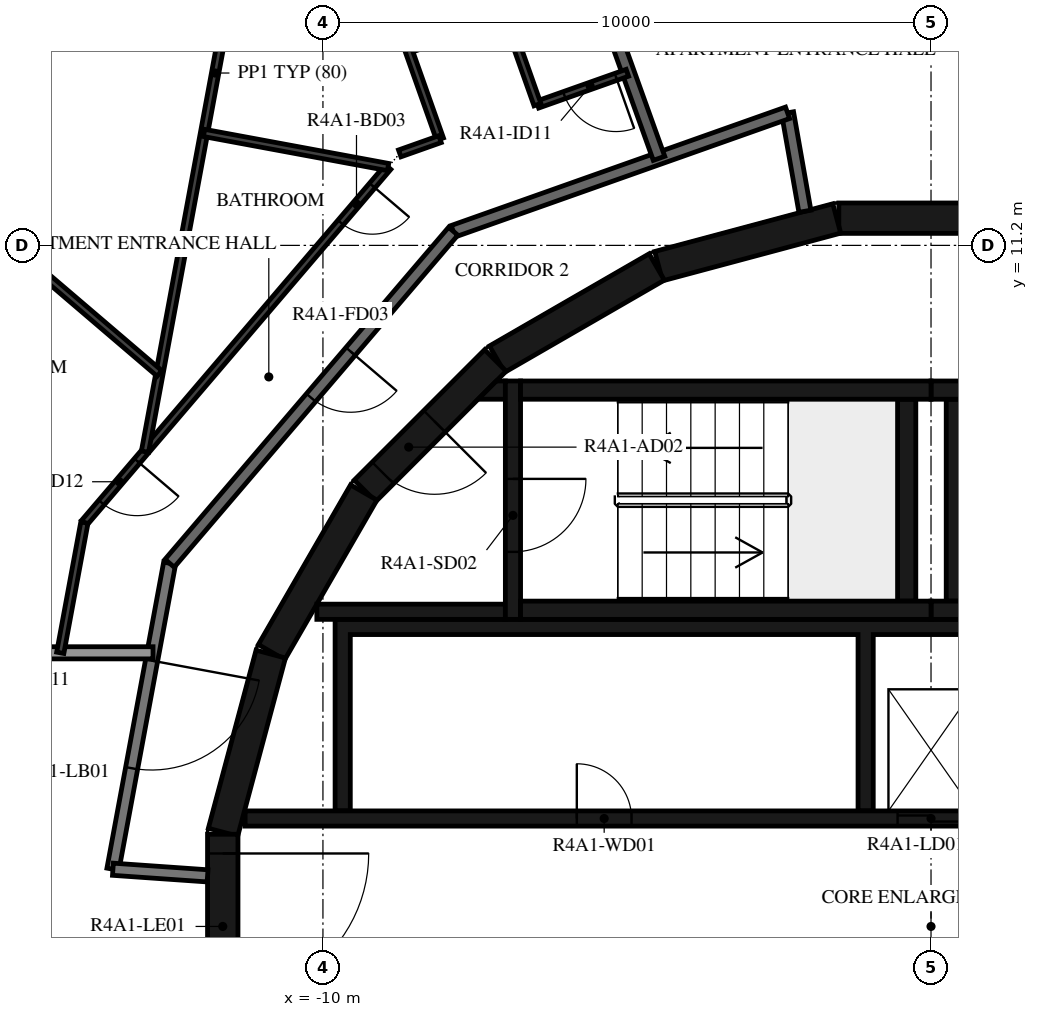
"""IFC4 building model, lengths in metres.
Left out: names, types, materials, properties, quantities, classifications, styles, units other than length and angle.
Written with IfcOpenShell. Run it as: python <this file> out.ifc"""

import sys

from ifc_helpers import new_model, si_unit, direction, frame, frame_2d, origin, place, context, subcontext, project, spatial, polyline, rectangle, outline, extrude, element, fill, save


model = new_model("IFC4")
c1 = context("Model", 3, precision=1e-05, world=origin(), true_north=direction((0.0, 1.0)))
c2 = subcontext(c1, "Body", "Model", "MODEL_VIEW")
j1 = project(units=[si_unit("LENGTHUNIT", "METRE"), si_unit("PLANEANGLEUNIT", "RADIAN")], contexts=[c1])
p1 = place(None, origin())
s1 = spatial("IfcSite", under=j1, at=p1, CompositionType="ELEMENT")
p2 = place(p1, origin())
s2 = spatial("IfcBuilding", under=s1, at=p2, CompositionType="ELEMENT")
p3 = place(p2, frame((0.0, 0.0, 155.2)))
s3 = spatial("IfcBuildingStorey", under=s2, at=p3, CompositionType="ELEMENT", Elevation=155.2)
for number, where, z_axis, x_axis in (
    (1, (1.516, 11.647, 0.0), (0.0, 0.0, 1.0), (-1.0, 0.0, 0.0)),
    (2, (-1.55, 11.643, 0.0), (0.0, 0.0, 1.0), (-0.966, -0.259, 0.0)),
    (3, (-4.51, 10.845, 0.0), (0.0, 0.0, 1.0), (-0.866, -0.5, 0.0)),
):
    element("IfcWall", number, at=place(p3, frame(where, z_axis=z_axis, x_axis=x_axis)), inside=s3, PredefinedType="SHEAR", context=c2, shape_type="SweptSolid", body=[
        extrude(rectangle(XDim=3.033, YDim=0.5, at=frame_2d((1.516, 0.0))), origin(), (0.0, 0.0, 1.0), 3.12),
    ])
p4 = place(p3, frame((-7.164, 9.308, 0.0), z_axis=(0.0, 0.0, 1.0), x_axis=(-0.707106781187, -0.707106781187, 0.0)))
e4 = element("IfcWall", 4, at=p4, inside=s3, PredefinedType="SHEAR", context=c2, shape_type="SweptSolid", body=[
    extrude(rectangle(XDim=3.032, YDim=0.5, at=frame_2d((1.516, 0.0))), origin(), (0.0, 0.0, 1.0), 3.12),
])
p5 = place(p4, frame((1.416, 0.0, 0.0)))
e5 = element("IfcOpeningElement", 5, at=p5, cuts=e4, PredefinedType="OPENING", context=c2, shape_type="SweptSolid", body=[
    extrude(rectangle(XDim=1.2, YDim=2.1, at=frame_2d((0.6, 1.05))), frame((0.0, 0.26, 0.0), z_axis=(0.0, -1.0, 0.0), x_axis=(1.0, 0.0, 0.0)), (0.0, 0.0, 1.0), 0.52),
])
for number, where, z_axis, x_axis in (
    (6, (-9.329, 7.137, 0.0), (0.0, 0.0, 1.0), (-0.5, -0.866, 0.0)),
    (7, (-10.858, 4.479, 0.0), (0.0, 0.0, 1.0), (-0.259, -0.966, 0.0)),
):
    element("IfcWall", number, at=place(p3, frame(where, z_axis=z_axis, x_axis=x_axis)), inside=s3, PredefinedType="SHEAR", context=c2, shape_type="SweptSolid", body=[
        extrude(rectangle(XDim=3.033, YDim=0.5, at=frame_2d((1.516, 0.0))), origin(), (0.0, 0.0, 1.0), 3.12),
    ])
p6 = place(p3, frame((-11.647, 1.516, 0.0), z_axis=(0.0, 0.0, 1.0), x_axis=(0.0, -1.0, 0.0)))
e8 = element("IfcWall", 8, at=p6, inside=s3, PredefinedType="SHEAR", context=c2, shape_type="SweptSolid", body=[
    extrude(rectangle(XDim=3.033, YDim=0.5, at=frame_2d((1.516, 0.0))), origin(), (0.0, 0.0, 1.0), 3.12),
])
p7 = place(p6, frame((0.316, 0.0, 0.0)))
e9 = element("IfcOpeningElement", 9, at=p7, cuts=e8, PredefinedType="OPENING", context=c2, shape_type="SweptSolid", body=[
    extrude(rectangle(XDim=2.4, YDim=2.1, at=frame_2d((1.2, 1.05))), frame((0.0, 0.26, 0.0), z_axis=(0.0, -1.0, 0.0), x_axis=(1.0, 0.0, 0.0)), (0.0, 0.0, 1.0), 0.52),
])
for number, where, z_axis, x_axis in (
    (10, (0.0, 5.2, 0.0), (0.0, 0.0, 1.0), (1.0, 0.0, 0.0)),
    (11, (0.0, 8.82, 0.0), (0.0, 0.0, 1.0), (1.0, 0.0, 0.0)),
):
    element("IfcWall", number, at=place(p3, frame(where, z_axis=z_axis, x_axis=x_axis)), inside=s3, PredefinedType="SHEAR", context=c2, shape_type="SweptSolid", body=[
        extrude(rectangle(XDim=6.75, YDim=0.3, at=frame_2d((3.375, 0.0))), origin(), (0.0, 0.0, 1.0), 3.12),
    ])
p8 = place(p3, frame((0.4, 5.35, 0.0), z_axis=(0.0, 0.0, 1.0), x_axis=(0.0, 1.0, 0.0)))
e12 = element("IfcWall", 12, at=p8, inside=s3, PredefinedType="SHEAR", context=c2, shape_type="SweptSolid", body=[
    extrude(rectangle(XDim=3.32, YDim=0.3, at=frame_2d((1.66, 0.0))), origin(), (0.0, 0.0, 1.0), 3.12),
])
for number, where, z_axis, x_axis in (
    (13, (-6.75, 5.2, 0.0), (0.0, 0.0, 1.0), (1.0, 0.0, 0.0)),
    (14, (-6.75, 8.82, 0.0), (0.0, 0.0, 1.0), (1.0, 0.0, 0.0)),
):
    element("IfcWall", number, at=place(p3, frame(where, z_axis=z_axis, x_axis=x_axis)), inside=s3, PredefinedType="SHEAR", context=c2, shape_type="SweptSolid", body=[
        extrude(rectangle(XDim=6.75, YDim=0.3, at=frame_2d((3.375, 0.0))), origin(), (0.0, 0.0, 1.0), 3.12),
    ])
p9 = place(p3, frame((-0.4, 5.35, 0.0), z_axis=(0.0, 0.0, 1.0), x_axis=(0.0, 1.0, 0.0)))
e15 = element("IfcWall", 15, at=p9, inside=s3, PredefinedType="SHEAR", context=c2, shape_type="SweptSolid", body=[
    extrude(rectangle(XDim=3.32, YDim=0.3, at=frame_2d((1.66, 0.0))), origin(), (0.0, 0.0, 1.0), 3.12),
])
p10 = place(p3, frame((-6.875, 8.97, 0.0), z_axis=(0.0, 0.0, 1.0), x_axis=(0.0, -1.0, 0.0)))
e16 = element("IfcWall", 16, at=p10, inside=s3, PredefinedType="SHEAR", context=c2, shape_type="SweptSolid", body=[
    extrude(rectangle(XDim=3.92, YDim=0.25, at=frame_2d((1.96, 0.0))), origin(), (0.0, 0.0, 1.0), 3.12),
])
p11 = place(p10, frame((1.61, 0.0, 0.0)))
e17 = element("IfcOpeningElement", 17, at=p11, cuts=e16, PredefinedType="OPENING", context=c2, shape_type="SweptSolid", body=[
    extrude(rectangle(XDim=1.2, YDim=2.1, at=frame_2d((0.6, 1.05))), frame((0.0, 0.135, 0.0), z_axis=(0.0, -1.0, 0.0), x_axis=(1.0, 0.0, 0.0)), (0.0, 0.0, 1.0), 0.27),
])
p12 = place(p3, frame((-7.0, 5.175, 0.0), z_axis=(0.0, 0.0, 1.0), x_axis=(-1.0, 0.0, 0.0)))
e18 = element("IfcWall", 18, at=p12, inside=s3, PredefinedType="SHEAR", context=c2, shape_type="SweptSolid", body=[
    extrude(rectangle(XDim=3.1, YDim=0.25, at=frame_2d((1.55, 0.0))), origin(), (0.0, 0.0, 1.0), 3.12),
])
p13 = place(p3, origin())
e19 = element("IfcWall", 19, at=p13, inside=s3, PredefinedType="SHEAR", context=c2, shape_type="SweptSolid", body=[
    extrude(outline(polyline([(-7.148, 8.97), (-7.0, 8.97), (-7.0, 8.67), (-7.448, 8.67), (-7.148, 8.97)])), origin(), (0.0, 0.0, 1.0), 3.12),
])
p14 = place(p3, origin())
e20 = element("IfcWall", 20, at=p14, inside=s3, PredefinedType="SHEAR", context=c2, shape_type="SweptSolid", body=[
    extrude(outline(polyline([(-9.55, 4.8), (-1.2, 4.8), (-1.2, 1.9), (-0.95, 1.9), (-0.95, 4.8), (0.95, 4.8), (0.95, 1.9), (1.2, 1.9), (1.2, 4.8), (3.1, 4.8), (3.1, 1.9), (3.35, 1.9), (3.35, 4.8), (5.25, 4.8), (5.25, 1.9), (5.5, 1.9), (5.5, 4.8), (7.4, 4.8), (7.4, 1.9), (7.65, 1.9), (7.65, 4.8), (9.55, 4.8), (9.55, 1.9), (9.8, 1.9), (9.8, 4.8), (9.8, 5.05), (-9.8, 5.05), (-9.8, 4.8), (-9.8, 1.9), (-9.55, 1.9), (-9.55, 4.8)])), origin(), (0.0, 0.0, 1.0), 3.12),
])
p15 = place(p3, frame((-11.28, 1.775, 0.0), z_axis=(0.0, 0.0, 1.0), x_axis=(1.0, 0.0, 0.0)))
e21 = element("IfcWall", 21, at=p15, inside=s3, PredefinedType="SHEAR", context=c2, shape_type="SweptSolid", body=[
    extrude(rectangle(XDim=14.38, YDim=0.25, at=frame_2d((7.19, 0.0))), origin(), (0.0, 0.0, 1.0), 3.12),
])
p16 = place(p15, frame((10.73, 0.0, 0.0)))
e22 = element("IfcOpeningElement", 22, at=p16, cuts=e21, PredefinedType="OPENING", context=c2, shape_type="SweptSolid", body=[
    extrude(rectangle(XDim=1.1, YDim=2.1, at=frame_2d((0.55, 1.05))), frame((0.0, 0.135, 0.0), z_axis=(0.0, -1.0, 0.0), x_axis=(1.0, 0.0, 0.0)), (0.0, 0.0, 1.0), 0.27),
])
p17 = place(p15, frame((12.88, 0.0, 0.0)))
e23 = element("IfcOpeningElement", 23, at=p17, cuts=e21, PredefinedType="OPENING", context=c2, shape_type="SweptSolid", body=[
    extrude(rectangle(XDim=1.1, YDim=2.1, at=frame_2d((0.55, 1.05))), frame((0.0, 0.135, 0.0), z_axis=(0.0, -1.0, 0.0), x_axis=(1.0, 0.0, 0.0)), (0.0, 0.0, 1.0), 0.27),
])
p18 = place(p15, frame((5.455, 0.0, 0.0)))
e24 = element("IfcOpeningElement", 24, at=p18, cuts=e21, PredefinedType="OPENING", context=c2, shape_type="SweptSolid", body=[
    extrude(rectangle(XDim=0.9, YDim=2.1, at=frame_2d((0.45, 1.05))), frame((0.0, 0.135, 0.0), z_axis=(0.0, -1.0, 0.0), x_axis=(1.0, 0.0, 0.0)), (0.0, 0.0, 1.0), 0.27),
])
p19 = place(p3, frame((-12.521, 5.972, 0.0), z_axis=(0.0, 0.0, 1.0), x_axis=(-0.182251559718, -0.983251935661, 0.0)))
e25 = element("IfcWall", 25, at=p19, inside=s3, PredefinedType="STANDARD", context=c2, shape_type="SweptSolid", body=[
    extrude(rectangle(XDim=5.117, YDim=0.2, at=frame_2d((2.559, 0.0))), origin(), (0.0, 0.0, 1.0), 3.12),
])
p20 = place(p19, frame((1.627, 0.0, 0.0)))
e26 = element("IfcOpeningElement", 26, at=p20, cuts=e25, PredefinedType="OPENING", context=c2, shape_type="SweptSolid", body=[
    extrude(rectangle(XDim=1.8, YDim=2.1, at=frame_2d((0.9, 1.05))), frame((0.0, 0.11, 0.0), z_axis=(0.0, -1.0, 0.0), x_axis=(1.0, 0.0, 0.0)), (0.0, 0.0, 1.0), 0.22),
])
p21 = place(p3, frame((-13.454, 0.941, 0.0), z_axis=(0.0, 0.0, 1.0), x_axis=(0.99755155062, -0.069934997354, 0.0)))
e27 = element("IfcWall", 27, at=p21, inside=s3, PredefinedType="STANDARD", context=c2, shape_type="SweptSolid", body=[
    extrude(rectangle(XDim=1.561, YDim=0.2, at=frame_2d((0.78, 0.0))), origin(), (0.0, 0.0, 1.0), 3.12),
])
p22 = place(p3, frame((-2.074, 11.761, 0.0), z_axis=(0.0, 0.0, 1.0), x_axis=(-0.1736412798, 0.984808969267, 0.0)))
e28 = element("IfcWall", 28, at=p22, inside=s3, PredefinedType="STANDARD", context=c2, shape_type="SweptSolid", body=[
    extrude(rectangle(XDim=1.644, YDim=0.2, at=frame_2d((0.822, 0.0))), origin(), (0.0, 0.0, 1.0), 3.12),
])
p23 = place(p3, frame((-2.359, 13.38, 0.0), z_axis=(0.0, 0.0, 1.0), x_axis=(-0.942647529236, -0.333789807551, 0.0)))
e29 = element("IfcWall", 29, at=p23, inside=s3, PredefinedType="STANDARD", context=c2, shape_type="SweptSolid", body=[
    extrude(rectangle(XDim=5.833, YDim=0.2, at=frame_2d((2.917, 0.0))), origin(), (0.0, 0.0, 1.0), 3.12),
])
p24 = place(p3, frame((-7.858, 11.433, 0.0), z_axis=(0.0, 0.0, 1.0), x_axis=(-0.649440801937, -0.760412154545, 0.0)))
e30 = element("IfcWall", 30, at=p24, inside=s3, PredefinedType="STANDARD", context=c2, shape_type="SweptSolid", body=[
    extrude(rectangle(XDim=7.181, YDim=0.2, at=frame_2d((3.59, 0.0))), origin(), (0.0, 0.0, 1.0), 3.12),
])
p25 = place(p24, frame((2.6, 0.0, 0.0)))
e31 = element("IfcOpeningElement", 31, at=p25, cuts=e30, PredefinedType="OPENING", context=c2, shape_type="SweptSolid", body=[
    extrude(rectangle(XDim=1.0, YDim=2.1, at=frame_2d((0.5, 1.05))), frame((0.0, 0.11, 0.0), z_axis=(0.0, -1.0, 0.0), x_axis=(1.0, 0.0, 0.0)), (0.0, 0.0, 1.0), 0.22),
])
p26 = place(p3, frame((-12.794, 4.5, 0.0), z_axis=(0.0, 0.0, 1.0), x_axis=(-1.0, 0.0, 0.0)))
e32 = element("IfcWall", 32, at=p26, inside=s3, PredefinedType="STANDARD", context=c2, shape_type="SweptSolid", body=[
    extrude(rectangle(XDim=5.106, YDim=0.2, at=frame_2d((2.553, 0.0))), origin(), (0.0, 0.0, 1.0), 2.73),
])
p27 = place(p3, frame((-6.185, 17.402, 0.0), z_axis=(0.0, 0.0, 1.0), x_axis=(0.337736730281, -0.941240618024, 0.0)))
e33 = element("IfcWall", 33, at=p27, inside=s3, PredefinedType="STANDARD", context=c2, shape_type="SweptSolid", body=[
    extrude(rectangle(XDim=5.068, YDim=0.2, at=frame_2d((2.534, 0.0))), origin(), (0.0, 0.0, 1.0), 3.12),
])
p28 = place(p3, frame((8.702, 12.206, 0.0), z_axis=(0.0, 0.0, 1.0), x_axis=(-0.760401313718, 0.649453494945, 0.0)))
e34 = element("IfcWall", 34, at=p28, inside=s3, PredefinedType="PARTITIONING", context=c2, shape_type="SweptSolid", body=[
    extrude(rectangle(XDim=16.724, YDim=0.12, at=frame_2d((8.362, 0.0))), origin(), (0.0, 0.0, 1.0), 3.12),
])
p29 = place(p28, frame((0.2, 0.0, 0.0)))
e35 = element("IfcOpeningElement", 35, at=p29, cuts=e34, PredefinedType="OPENING", context=c2, shape_type="SweptSolid", body=[
    extrude(rectangle(XDim=0.9, YDim=2.1, at=frame_2d((0.45, 1.05))), frame((0.0, 0.07, 0.0), z_axis=(0.0, -1.0, 0.0), x_axis=(1.0, 0.0, 0.0)), (0.0, 0.0, 1.0), 0.14),
])
p30 = place(p28, frame((7.099, 0.0, 0.0)))
e36 = element("IfcOpeningElement", 36, at=p30, cuts=e34, PredefinedType="OPENING", context=c2, shape_type="SweptSolid", body=[
    extrude(rectangle(XDim=0.9, YDim=2.1, at=frame_2d((0.45, 1.05))), frame((0.0, 0.07, 0.0), z_axis=(0.0, -1.0, 0.0), x_axis=(1.0, 0.0, 0.0)), (0.0, 0.0, 1.0), 0.14),
])
p31 = place(p3, frame((6.641, 13.923, 0.0), z_axis=(0.0, 0.0, 1.0), x_axis=(-0.983250157272, 0.182261153912, 0.0)))
e37 = element("IfcWall", 37, at=p31, inside=s3, PredefinedType="PARTITIONING", context=c2, shape_type="SweptSolid", body=[
    extrude(rectangle(XDim=7.985, YDim=0.12, at=frame_2d((3.992, 0.0))), origin(), (0.0, 0.0, 1.0), 3.12),
])
p32 = place(p31, frame((1.4, 0.0, 0.0)))
e38 = element("IfcOpeningElement", 38, at=p32, cuts=e37, PredefinedType="OPENING", context=c2, shape_type="SweptSolid", body=[
    extrude(rectangle(XDim=0.8, YDim=2.1, at=frame_2d((0.4, 1.05))), frame((0.0, 0.07, 0.0), z_axis=(0.0, -1.0, 0.0), x_axis=(1.0, 0.0, 0.0)), (0.0, 0.0, 1.0), 0.14),
])
p33 = place(p31, frame((5.069, 0.0, 0.0)))
e39 = element("IfcOpeningElement", 39, at=p33, cuts=e37, PredefinedType="OPENING", context=c2, shape_type="SweptSolid", body=[
    extrude(rectangle(XDim=0.9, YDim=2.1, at=frame_2d((0.45, 1.05))), frame((0.0, 0.07, 0.0), z_axis=(0.0, -1.0, 0.0), x_axis=(1.0, 0.0, 0.0)), (0.0, 0.0, 1.0), 0.14),
])
p34 = place(p3, frame((-4.993, 14.038, 0.0), z_axis=(0.0, 0.0, 1.0), x_axis=(-0.942685371668, -0.333682918418, 0.0)))
e40 = element("IfcWall", 40, at=p34, inside=s3, PredefinedType="PARTITIONING", context=c2, shape_type="SweptSolid", body=[
    extrude(rectangle(XDim=1.569, YDim=0.12, at=frame_2d((0.784, 0.0))), origin(), (0.0, 0.0, 1.0), 3.12),
])
p35 = place(p34, frame((0.2, 0.0, 0.0)))
e41 = element("IfcOpeningElement", 41, at=p35, cuts=e40, PredefinedType="OPENING", context=c2, shape_type="SweptSolid", body=[
    extrude(rectangle(XDim=0.9, YDim=2.1, at=frame_2d((0.45, 1.05))), frame((0.0, 0.07, 0.0), z_axis=(0.0, -1.0, 0.0), x_axis=(1.0, 0.0, 0.0)), (0.0, 0.0, 1.0), 0.14),
])
p36 = place(p3, frame((-6.472, 13.515, 0.0), z_axis=(0.0, 0.0, 1.0), x_axis=(-0.333809516424, 0.942640550127, 0.0)))
e42 = element("IfcWall", 42, at=p36, inside=s3, PredefinedType="PARTITIONING", context=c2, shape_type="SweptSolid", body=[
    extrude(rectangle(XDim=1.562, YDim=0.12, at=frame_2d((0.781, 0.0))), origin(), (0.0, 0.0, 1.0), 3.12),
])
p37 = place(p3, frame((-6.993, 14.987, 0.0), z_axis=(0.0, 0.0, 1.0), x_axis=(-0.942599915297, -0.33392424243, 0.0)))
e43 = element("IfcWall", 43, at=p37, inside=s3, PredefinedType="PARTITIONING", context=c2, shape_type="SweptSolid", body=[
    extrude(rectangle(XDim=1.7, YDim=0.12, at=frame_2d((0.85, 0.0))), origin(), (0.0, 0.0, 1.0), 3.12),
])
p38 = place(p3, frame((-8.596, 14.419, 0.0), z_axis=(0.0, 0.0, 1.0), x_axis=(0.333670576497, -0.942689740254, 0.0)))
e44 = element("IfcWall", 44, at=p38, inside=s3, PredefinedType="PARTITIONING", context=c2, shape_type="SweptSolid", body=[
    extrude(rectangle(XDim=1.562, YDim=0.12, at=frame_2d((0.781, 0.0))), origin(), (0.0, 0.0, 1.0), 3.12),
])
p39 = place(p3, frame((-8.075, 12.947, 0.0), z_axis=(0.0, 0.0, 1.0), x_axis=(-0.942649994227, -0.33378284615, 0.0)))
e45 = element("IfcWall", 45, at=p39, inside=s3, PredefinedType="PARTITIONING", context=c2, shape_type="SweptSolid", body=[
    extrude(rectangle(XDim=0.703, YDim=0.12, at=frame_2d((0.352, 0.0))), origin(), (0.0, 0.0, 1.0), 3.12),
])
p40 = place(p3, frame((-8.929, 12.488, 0.0), z_axis=(0.0, 0.0, 1.0), x_axis=(-0.64944646045, -0.760407321775, 0.0)))
e46 = element("IfcWall", 46, at=p40, inside=s3, PredefinedType="PARTITIONING", context=c2, shape_type="SweptSolid", body=[
    extrude(rectangle(XDim=7.69, YDim=0.12, at=frame_2d((3.845, 0.0))), origin(), (0.0, 0.0, 1.0), 3.12),
])
p41 = place(p40, frame((0.4, 0.0, 0.0)))
e47 = element("IfcOpeningElement", 47, at=p41, cuts=e46, PredefinedType="OPENING", context=c2, shape_type="SweptSolid", body=[
    extrude(rectangle(XDim=0.8, YDim=2.1, at=frame_2d((0.4, 1.05))), frame((0.0, 0.07, 0.0), z_axis=(0.0, -1.0, 0.0), x_axis=(1.0, 0.0, 0.0)), (0.0, 0.0, 1.0), 0.14),
])
p42 = place(p40, frame((6.356, 0.0, 0.0)))
e48 = element("IfcOpeningElement", 48, at=p42, cuts=e46, PredefinedType="OPENING", context=c2, shape_type="SweptSolid", body=[
    extrude(rectangle(XDim=0.9, YDim=2.1, at=frame_2d((0.45, 1.05))), frame((0.0, 0.07, 0.0), z_axis=(0.0, -1.0, 0.0), x_axis=(1.0, 0.0, 0.0)), (0.0, 0.0, 1.0), 0.14),
])
p43 = place(p3, frame((-13.923, 6.641, 0.0), z_axis=(0.0, 0.0, 1.0), x_axis=(-0.182209715759, -0.983259690765, 0.0)))
e49 = element("IfcWall", 49, at=p43, inside=s3, PredefinedType="PARTITIONING", context=c2, shape_type="SweptSolid", body=[
    extrude(rectangle(XDim=2.177, YDim=0.12, at=frame_2d((1.089, 0.0))), origin(), (0.0, 0.0, 1.0), 3.12),
])
p44 = place(p3, frame((-10.618, 20.262, 0.0), z_axis=(0.0, 0.0, 1.0), x_axis=(-0.182222468274, -0.983257327487, 0.0)))
e50 = element("IfcWall", 50, at=p44, inside=s3, PredefinedType="PARTITIONING", context=c2, shape_type="SweptSolid", body=[
    extrude(rectangle(XDim=12.667, YDim=0.12, at=frame_2d((6.333, 0.0))), origin(), (0.0, 0.0, 1.0), 3.12),
])
p45 = place(p44, frame((2.57, 0.0, 0.0)))
e51 = element("IfcOpeningElement", 51, at=p45, cuts=e50, PredefinedType="OPENING", context=c2, shape_type="SweptSolid", body=[
    extrude(rectangle(XDim=0.9, YDim=2.1, at=frame_2d((0.45, 1.05))), frame((0.0, 0.07, 0.0), z_axis=(0.0, -1.0, 0.0), x_axis=(1.0, 0.0, 0.0)), (0.0, 0.0, 1.0), 0.14),
])
p46 = place(p3, frame((-11.955, 13.049, 0.0), z_axis=(0.0, 0.0, 1.0), x_axis=(0.983247271586, -0.182276720725, 0.0)))
e52 = element("IfcWall", 52, at=p46, inside=s3, PredefinedType="PARTITIONING", context=c2, shape_type="SweptSolid", body=[
    extrude(rectangle(XDim=3.078, YDim=0.12, at=frame_2d((1.539, 0.0))), origin(), (0.0, 0.0, 1.0), 3.12),
])
p47 = place(p3, frame((-16.552, 12.394, 0.0), z_axis=(0.0, 0.0, 1.0), x_axis=(0.760425586578, -0.649425074414, 0.0)))
e53 = element("IfcWall", 53, at=p47, inside=s3, PredefinedType="PARTITIONING", context=c2, shape_type="SweptSolid", body=[
    extrude(rectangle(XDim=5.081, YDim=0.12, at=frame_2d((2.541, 0.0))), origin(), (0.0, 0.0, 1.0), 3.12),
])
p48 = place(p11, origin())
e54 = element("IfcDoor", 54, at=p48, inside=s3, OperationType="SINGLE_SWING_LEFT", PredefinedType="DOOR", context=c2, shape_type="SweptSolid", body=[
    extrude(rectangle(XDim=1.2, YDim=2.1, at=frame_2d((0.6, 1.05))), frame((0.0, 0.025, 0.0), z_axis=(0.0, -1.0, 0.0), x_axis=(1.0, 0.0, 0.0)), (0.0, 0.0, 1.0), 0.05),
])
fill(e17, e54)
p49 = place(p5, origin())
e55 = element("IfcDoor", 55, at=p49, inside=s3, OperationType="SINGLE_SWING_RIGHT", PredefinedType="DOOR", context=c2, shape_type="SweptSolid", body=[
    extrude(rectangle(XDim=1.2, YDim=2.1, at=frame_2d((0.6, 1.05))), frame((0.0, 0.025, 0.0), z_axis=(0.0, -1.0, 0.0), x_axis=(1.0, 0.0, 0.0)), (0.0, 0.0, 1.0), 0.05),
])
fill(e5, e55)
p50 = place(p7, origin())
e56 = element("IfcDoor", 56, at=p50, inside=s3, OperationType="DOUBLE_DOOR_SINGLE_SWING", PredefinedType="DOOR", context=c2, shape_type="SweptSolid", body=[
    extrude(rectangle(XDim=2.4, YDim=2.1, at=frame_2d((1.2, 1.05))), frame((0.0, 0.025, 0.0), z_axis=(0.0, -1.0, 0.0), x_axis=(1.0, 0.0, 0.0)), (0.0, 0.0, 1.0), 0.05),
])
fill(e9, e56)
p51 = place(p16, origin())
e57 = element("IfcDoor", 57, at=p51, inside=s3, OperationType="DOUBLE_DOOR_SLIDING", PredefinedType="DOOR", context=c2, shape_type="SweptSolid", body=[
    extrude(rectangle(XDim=1.1, YDim=2.1, at=frame_2d((0.55, 1.05))), frame((0.0, 0.025, 0.0), z_axis=(0.0, -1.0, 0.0), x_axis=(1.0, 0.0, 0.0)), (0.0, 0.0, 1.0), 0.05),
])
fill(e22, e57)
p52 = place(p18, origin())
e58 = element("IfcDoor", 58, at=p52, inside=s3, OperationType="SINGLE_SWING_LEFT", PredefinedType="DOOR", context=c2, shape_type="SweptSolid", body=[
    extrude(rectangle(XDim=0.9, YDim=2.1, at=frame_2d((0.45, 1.05))), frame((0.0, 0.025, 0.0), z_axis=(0.0, -1.0, 0.0), x_axis=(1.0, 0.0, 0.0)), (0.0, 0.0, 1.0), 0.05),
])
fill(e24, e58)
p53 = place(p25, origin())
e59 = element("IfcDoor", 59, at=p53, inside=s3, OperationType="SINGLE_SWING_LEFT", PredefinedType="DOOR", context=c2, shape_type="SweptSolid", body=[
    extrude(rectangle(XDim=1.0, YDim=2.1, at=frame_2d((0.5, 1.05))), frame((0.0, 0.025, 0.0), z_axis=(0.0, -1.0, 0.0), x_axis=(1.0, 0.0, 0.0)), (0.0, 0.0, 1.0), 0.05),
])
fill(e31, e59)
p54 = place(p35, origin())
e60 = element("IfcDoor", 60, at=p54, inside=s3, OperationType="SINGLE_SWING_LEFT", PredefinedType="DOOR", context=c2, shape_type="SweptSolid", body=[
    extrude(rectangle(XDim=0.9, YDim=2.1, at=frame_2d((0.45, 1.05))), frame((0.0, 0.025, 0.0), z_axis=(0.0, -1.0, 0.0), x_axis=(1.0, 0.0, 0.0)), (0.0, 0.0, 1.0), 0.05),
])
fill(e41, e60)
p55 = place(p41, origin())
e61 = element("IfcDoor", 61, at=p55, inside=s3, OperationType="SINGLE_SWING_LEFT", PredefinedType="DOOR", context=c2, shape_type="SweptSolid", body=[
    extrude(rectangle(XDim=0.8, YDim=2.1, at=frame_2d((0.4, 1.05))), frame((0.0, 0.025, 0.0), z_axis=(0.0, -1.0, 0.0), x_axis=(1.0, 0.0, 0.0)), (0.0, 0.0, 1.0), 0.05),
])
fill(e47, e61)
p56 = place(p42, origin())
e62 = element("IfcDoor", 62, at=p56, inside=s3, OperationType="SINGLE_SWING_LEFT", PredefinedType="DOOR", context=c2, shape_type="SweptSolid", body=[
    extrude(rectangle(XDim=0.9, YDim=2.1, at=frame_2d((0.45, 1.05))), frame((0.0, 0.025, 0.0), z_axis=(0.0, -1.0, 0.0), x_axis=(1.0, 0.0, 0.0)), (0.0, 0.0, 1.0), 0.05),
])
fill(e48, e62)
p57 = place(p20, origin())
e63 = element("IfcDoor", 63, at=p57, inside=s3, OperationType="DOUBLE_DOOR_SINGLE_SWING", PredefinedType="DOOR", context=c2, shape_type="SweptSolid", body=[
    extrude(rectangle(XDim=1.8, YDim=2.1, at=frame_2d((0.9, 1.05))), frame((0.0, 0.025, 0.0), z_axis=(0.0, -1.0, 0.0), x_axis=(1.0, 0.0, 0.0)), (0.0, 0.0, 1.0), 0.05),
])
fill(e26, e63)
save(model, sys.argv[1])
